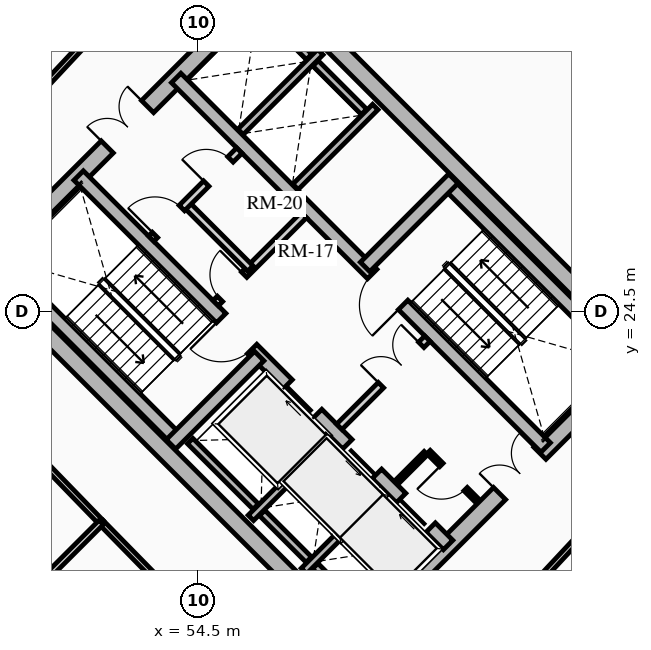
"""IFC4 building model, lengths in metres.
Left out: names, types, materials, properties, quantities, classifications, styles, units other than length and angle.
Written with IfcOpenShell. Run it as: python <this file> out.ifc"""

import sys

from ifc_helpers import new_model, si_unit, direction, frame, frame_2d, origin, place, context, subcontext, project, spatial, rectangle, extrude, source, transform, mapped, element, fill, save


model = new_model("IFC4")
c1 = context("Model", 3, precision=1e-05, world=origin(), true_north=direction((0.0, 1.0)))
c2 = subcontext(c1, "Body", "Model", "MODEL_VIEW")
j1 = project(units=[si_unit("LENGTHUNIT", "METRE"), si_unit("PLANEANGLEUNIT", "RADIAN")], contexts=[c1])
p1 = place(None, origin())
s1 = spatial("IfcSite", under=j1, at=p1, CompositionType="ELEMENT")
p2 = place(p1, origin())
s2 = spatial("IfcBuilding", under=s1, at=p2, CompositionType="ELEMENT")
p3 = place(p2, frame((0.0, 0.0, 132.88)))
s3 = spatial("IfcBuildingStorey", under=s2, at=p3, CompositionType="ELEMENT", Elevation=132.88)
for number, where, z_axis, x_axis in (
    (1, (58.737, 15.697, 0.0), (0.0, 0.0, 1.0), (-0.707, 0.707, 0.0)),
    (2, (66.303, 23.263, 0.0), (0.0, 0.0, 1.0), (-0.707, 0.707, 0.0)),
):
    element("IfcWall", number, at=place(p3, frame(where, z_axis=z_axis, x_axis=x_axis)), inside=s3, PredefinedType="SHEAR", context=c2, shape_type="SweptSolid", body=[
        extrude(rectangle(XDim=14.2, YDim=0.45, at=frame_2d((7.1, 0.0))), origin(), (0.0, 0.0, 1.0), 3.72),
    ])
p4 = place(p3, frame((58.578, 15.856, 0.0), z_axis=(0.0, 0.0, 1.0), x_axis=(0.707106781187, 0.707106781187, 0.0)))
e3 = element("IfcWall", 3, at=p4, inside=s3, PredefinedType="SHEAR", context=c2, shape_type="SweptSolid", body=[
    extrude(rectangle(XDim=10.7, YDim=0.45, at=frame_2d((5.35, 0.0))), origin(), (0.0, 0.0, 1.0), 3.72),
])
m1 = source(origin(), c2, "Body", "SweptSolid", [
    extrude(rectangle(XDim=1.5, YDim=2.02, at=frame_2d((0.75, 1.01))), frame((0.0, 0.235, 0.0), z_axis=(0.0, -1.0, 0.0), x_axis=(1.0, 0.0, 0.0)), (0.0, 0.0, 1.0), 0.47),
])
p5 = place(p4, frame((5.45, 0.0, 0.0)))
e4 = element("IfcOpeningElement", 4, at=p5, cuts=e3, PredefinedType="OPENING", context=c2, shape_type="MappedRepresentation", body=[
    mapped(m1, transform((0.0, 0.0, 0.0), x_axis=(1.0, 0.0, 0.0), y_axis=(0.0, 1.0, 0.0), z_axis=(0.0, 0.0, 1.0), scale=1.0)),
])
p6 = place(p3, frame((48.856, 25.578, 0.0), z_axis=(0.0, 0.0, 1.0), x_axis=(0.707106781187, 0.707106781187, 0.0)))
e5 = element("IfcWall", 5, at=p6, inside=s3, PredefinedType="SHEAR", context=c2, shape_type="SweptSolid", body=[
    extrude(rectangle(XDim=10.7, YDim=0.45, at=frame_2d((5.35, 0.0))), origin(), (0.0, 0.0, 1.0), 3.72),
])
p7 = place(p6, frame((4.6, 0.0, 0.0)))
e6 = element("IfcOpeningElement", 6, at=p7, cuts=e5, PredefinedType="OPENING", context=c2, shape_type="MappedRepresentation", body=[
    mapped(m1, transform((0.0, 0.0, 0.0), x_axis=(1.0, 0.0, 0.0), y_axis=(0.0, 1.0, 0.0), z_axis=(0.0, 0.0, 1.0), scale=1.0)),
])
p8 = place(p3, frame((61.078, 18.355, 0.0), z_axis=(0.0, 0.0, 1.0), x_axis=(-0.707106781187, 0.707106781187, 0.0)))
e7 = element("IfcWall", 7, at=p8, inside=s3, PredefinedType="SHEAR", context=c2, shape_type="SweptSolid", body=[
    extrude(rectangle(XDim=13.75, YDim=0.35, at=frame_2d((6.875, 0.0))), origin(), (0.0, 0.0, 1.0), 3.72),
])
m2 = source(origin(), c2, "Body", "SweptSolid", [
    extrude(rectangle(XDim=1.1, YDim=2.015, at=frame_2d((0.55, 1.007))), frame((0.0, 0.185, 0.0), z_axis=(0.0, -1.0, 0.0), x_axis=(1.0, 0.0, 0.0)), (0.0, 0.0, 1.0), 0.37),
])
p9 = place(p8, frame((4.875, 0.0, 0.0)))
e8 = element("IfcOpeningElement", 8, at=p9, cuts=e7, PredefinedType="OPENING", context=c2, shape_type="MappedRepresentation", body=[
    mapped(m2, transform((0.0, 0.0, 0.0), x_axis=(1.0, 0.0, 0.0), y_axis=(0.0, 1.0, 0.0), z_axis=(0.0, 0.0, 1.0), scale=1.0)),
])
p10 = place(p8, frame((0.65, 0.0, 0.0)))
e9 = element("IfcOpeningElement", 9, at=p10, cuts=e7, PredefinedType="OPENING", context=c2, shape_type="MappedRepresentation", body=[
    mapped(m2, transform((0.0, 0.0, 0.0), x_axis=(1.0, 0.0, 0.0), y_axis=(0.0, 1.0, 0.0), z_axis=(0.0, 0.0, 1.0), scale=1.0)),
])
p11 = place(p8, frame((2.65, 0.0, 0.0)))
e10 = element("IfcOpeningElement", 10, at=p11, cuts=e7, PredefinedType="OPENING", context=c2, shape_type="MappedRepresentation", body=[
    mapped(m2, transform((0.0, 0.0, 0.0), x_axis=(1.0, 0.0, 0.0), y_axis=(0.0, 1.0, 0.0), z_axis=(0.0, 0.0, 1.0), scale=1.0)),
])
m3 = source(origin(), c2, "Body", "SweptSolid", [
    extrude(rectangle(XDim=1.15, YDim=2.02, at=frame_2d((0.575, 1.01))), frame((0.0, 0.185, 0.0), z_axis=(0.0, -1.0, 0.0), x_axis=(1.0, 0.0, 0.0)), (0.0, 0.0, 1.0), 0.37),
])
p12 = place(p8, frame((7.295, 0.0, 0.0)))
e11 = element("IfcOpeningElement", 11, at=p12, cuts=e7, PredefinedType="OPENING", context=c2, shape_type="MappedRepresentation", body=[
    mapped(m3, transform((0.0, 0.0, 0.0), x_axis=(1.0, 0.0, 0.0), y_axis=(0.0, 1.0, 0.0), z_axis=(0.0, 0.0, 1.0), scale=1.0)),
])
p13 = place(p3, frame((63.645, 20.922, 0.0), z_axis=(0.0, 0.0, 1.0), x_axis=(-0.707106781187, 0.707106781187, 0.0)))
e12 = element("IfcWall", 12, at=p13, inside=s3, PredefinedType="SHEAR", context=c2, shape_type="SweptSolid", body=[
    extrude(rectangle(XDim=13.75, YDim=0.35, at=frame_2d((6.875, 0.0))), origin(), (0.0, 0.0, 1.0), 3.72),
])
p14 = place(p13, frame((5.305, 0.0, 0.0)))
e13 = element("IfcOpeningElement", 13, at=p14, cuts=e12, PredefinedType="OPENING", context=c2, shape_type="MappedRepresentation", body=[
    mapped(m3, transform((0.0, 0.0, 0.0), x_axis=(1.0, 0.0, 0.0), y_axis=(0.0, 1.0, 0.0), z_axis=(0.0, 0.0, 1.0), scale=1.0)),
])
p15 = place(p3, frame((53.922, 21.141, 0.0), z_axis=(0.0, 0.0, 1.0), x_axis=(-0.707088616009, 0.707124945897, 0.0)))
e14 = element("IfcWall", 14, at=p15, inside=s3, PredefinedType="SHEAR", context=c2, shape_type="SweptSolid", body=[
    extrude(rectangle(XDim=6.72, YDim=0.35, at=frame_2d((3.36, 0.0))), origin(), (0.0, 0.0, 1.0), 3.72),
])
p16 = place(p3, frame((53.784, 21.003, 0.0), z_axis=(0.0, 0.0, 1.0), x_axis=(0.707106781187, 0.707106781187, 0.0)))
e15 = element("IfcWall", 15, at=p16, inside=s3, PredefinedType="SHEAR", context=c2, shape_type="SweptSolid", body=[
    extrude(rectangle(XDim=3.285, YDim=0.35, at=frame_2d((1.643, 0.0))), origin(), (0.0, 0.0, 1.0), 3.72),
])
p17 = place(p3, frame((65.83, 23.107, 0.0), z_axis=(0.0, 0.0, 1.0), x_axis=(-0.707088616009, 0.707124945897, 0.0)))
e16 = element("IfcWall", 16, at=p17, inside=s3, PredefinedType="SHEAR", context=c2, shape_type="SweptSolid", body=[
    extrude(rectangle(XDim=6.72, YDim=0.35, at=frame_2d((3.36, 0.0))), origin(), (0.0, 0.0, 1.0), 3.72),
])
p18 = place(p3, frame((58.893, 25.674, 0.0), z_axis=(0.0, 0.0, 1.0), x_axis=(0.707106781187, 0.707106781187, 0.0)))
e17 = element("IfcWall", 17, at=p18, inside=s3, PredefinedType="SHEAR", context=c2, shape_type="SweptSolid", body=[
    extrude(rectangle(XDim=3.285, YDim=0.35, at=frame_2d((1.643, 0.0))), origin(), (0.0, 0.0, 1.0), 3.72),
])
p19 = place(p3, frame((55.888, 19.069, 0.0), z_axis=(0.0, 0.0, 1.0), x_axis=(0.707106781187, 0.707106781187, 0.0)))
e18 = element("IfcWall", 18, at=p19, inside=s3, PredefinedType="SHEAR", context=c2, shape_type="SweptSolid", body=[
    extrude(rectangle(XDim=2.97, YDim=0.2, at=frame_2d((1.485, 0.0))), origin(), (0.0, 0.0, 1.0), 3.72),
])
p20 = place(p3, frame((56.015, 19.366, 0.0), z_axis=(0.0, 0.0, 1.0), x_axis=(-0.707106781187, 0.707106781187, 0.0)))
e19 = element("IfcWall", 19, at=p20, inside=s3, PredefinedType="SHEAR", context=c2, shape_type="SweptSolid", body=[
    extrude(rectangle(XDim=2.44, YDim=0.2, at=frame_2d((1.22, 0.0))), origin(), (0.0, 0.0, 1.0), 3.72),
])
p21 = place(p3, frame((57.284, 17.673, 0.0), z_axis=(0.0, 0.0, 1.0), x_axis=(0.707147878904, 0.70706568108, 0.0)))
e20 = element("IfcWall", 20, at=p21, inside=s3, PredefinedType="SHEAR", context=c2, shape_type="SweptSolid", body=[
    extrude(rectangle(XDim=2.97, YDim=0.2, at=frame_2d((1.485, 0.0))), origin(), (0.0, 0.0, 1.0), 3.72),
])
p22 = place(p3, frame((57.412, 17.97, 0.0), z_axis=(0.0, 0.0, 1.0), x_axis=(-0.707106781187, 0.707106781187, 0.0)))
e21 = element("IfcWall", 21, at=p22, inside=s3, PredefinedType="SHEAR", context=c2, shape_type="SweptSolid", body=[
    extrude(rectangle(XDim=1.735, YDim=0.2, at=frame_2d((0.867, 0.0))), origin(), (0.0, 0.0, 1.0), 3.72),
])
p23 = place(p3, frame((58.737, 16.644, 0.0), z_axis=(0.0, 0.0, 1.0), x_axis=(-0.707032117043, 0.707181437447, 0.0)))
e22 = element("IfcWall", 22, at=p23, inside=s3, PredefinedType="SHEAR", context=c2, shape_type="SweptSolid", body=[
    extrude(rectangle(XDim=1.635, YDim=0.2, at=frame_2d((0.817, 0.0))), origin(), (0.0, 0.0, 1.0), 3.72),
])
p24 = place(p3, frame((57.062, 27.781, 0.0), z_axis=(0.0, 0.0, 1.0), x_axis=(0.707106781187, 0.707106781187, 0.0)))
e23 = element("IfcWall", 23, at=p24, inside=s3, PredefinedType="SHEAR", context=c2, shape_type="SweptSolid", body=[
    extrude(rectangle(XDim=2.97, YDim=0.2, at=frame_2d((1.485, 0.0))), origin(), (0.0, 0.0, 1.0), 3.72),
])
p25 = place(p3, frame((55.615, 29.227, 0.0), z_axis=(0.0, 0.0, 1.0), x_axis=(0.707147878904, 0.70706568108, 0.0)))
e24 = element("IfcWall", 24, at=p25, inside=s3, PredefinedType="SHEAR", context=c2, shape_type="SweptSolid", body=[
    extrude(rectangle(XDim=2.97, YDim=0.2, at=frame_2d((1.485, 0.0))), origin(), (0.0, 0.0, 1.0), 3.72),
])
p26 = place(p3, frame((58.865, 29.754, 0.0), z_axis=(0.0, 0.0, 1.0), x_axis=(-0.707174411312, 0.707039144592, 0.0)))
e25 = element("IfcWall", 25, at=p26, inside=s3, PredefinedType="SHEAR", context=c2, shape_type="SweptSolid", body=[
    extrude(rectangle(XDim=1.805, YDim=0.2, at=frame_2d((0.902, 0.0))), origin(), (0.0, 0.0, 1.0), 3.72),
])
p27 = place(p3, frame((57.419, 31.2, 0.0), z_axis=(0.0, 0.0, 1.0), x_axis=(-0.707032117043, 0.707181437447, 0.0)))
e26 = element("IfcWall", 26, at=p27, inside=s3, PredefinedType="SHEAR", context=c2, shape_type="SweptSolid", body=[
    extrude(rectangle(XDim=1.635, YDim=0.2, at=frame_2d((0.817, 0.0))), origin(), (0.0, 0.0, 1.0), 3.72),
])
p28 = place(p3, frame((58.214, 21.467, 0.0), z_axis=(0.0, 0.0, 1.0), x_axis=(0.707106781187, 0.707106781187, 0.0)))
e27 = element("IfcWall", 27, at=p28, inside=s3, PredefinedType="PARTITIONING", context=c2, shape_type="SweptSolid", body=[
    extrude(rectangle(XDim=3.28, YDim=0.2, at=frame_2d((1.64, 0.0))), origin(), (0.0, 0.0, 1.0), 3.425),
])
m4 = source(origin(), c2, "Body", "SweptSolid", [
    extrude(rectangle(XDim=1.5, YDim=2.02, at=frame_2d((0.75, 1.01))), frame((0.0, 0.11, 0.0), z_axis=(0.0, -1.0, 0.0), x_axis=(1.0, 0.0, 0.0)), (0.0, 0.0, 1.0), 0.22),
])
p29 = place(p28, frame((1.55, 0.0, 0.0)))
e28 = element("IfcOpeningElement", 28, at=p29, cuts=e27, PredefinedType="OPENING", context=c2, shape_type="MappedRepresentation", body=[
    mapped(m4, transform((0.0, 0.0, 0.0), x_axis=(1.0, 0.0, 0.0), y_axis=(0.0, 1.0, 0.0), z_axis=(0.0, 0.0, 1.0), scale=1.0)),
])
p30 = place(p3, frame((54.961, 24.719, 0.0), z_axis=(0.0, 0.0, 1.0), x_axis=(0.707106781187, 0.707106781187, 0.0)))
e29 = element("IfcWall", 29, at=p30, inside=s3, PredefinedType="PARTITIONING", context=c2, shape_type="SweptSolid", body=[
    extrude(rectangle(XDim=3.28, YDim=0.2, at=frame_2d((1.64, 0.0))), origin(), (0.0, 0.0, 1.0), 3.425),
])
m5 = source(origin(), c2, "Body", "SweptSolid", [
    extrude(rectangle(XDim=0.9, YDim=2.005, at=frame_2d((0.45, 1.002))), frame((0.0, 0.11, 0.0), z_axis=(0.0, -1.0, 0.0), x_axis=(1.0, 0.0, 0.0)), (0.0, 0.0, 1.0), 0.22),
])
p31 = place(p30, frame((0.16, 0.0, 0.0)))
e30 = element("IfcOpeningElement", 30, at=p31, cuts=e29, PredefinedType="OPENING", context=c2, shape_type="MappedRepresentation", body=[
    mapped(m5, transform((0.0, 0.0, 0.0), x_axis=(1.0, 0.0, 0.0), y_axis=(0.0, 1.0, 0.0), z_axis=(0.0, 0.0, 1.0), scale=1.0)),
])
p32 = place(p3, frame((55.874, 25.631, 0.0), z_axis=(0.0, 0.0, 1.0), x_axis=(-0.707157639372, 0.707055919343, 0.0)))
e31 = element("IfcWall", 31, at=p32, inside=s3, PredefinedType="PARTITIONING", context=c2, shape_type="SweptSolid", body=[
    extrude(rectangle(XDim=2.4, YDim=0.2, at=frame_2d((1.2, 0.0))), origin(), (0.0, 0.0, 1.0), 3.425),
])
p33 = place(p3, frame((53.264, 26.416, 0.0), z_axis=(0.0, 0.0, 1.0), x_axis=(0.707106781187, 0.707106781187, 0.0)))
e32 = element("IfcWall", 32, at=p33, inside=s3, PredefinedType="PARTITIONING", context=c2, shape_type="SweptSolid", body=[
    extrude(rectangle(XDim=3.28, YDim=0.2, at=frame_2d((1.64, 0.0))), origin(), (0.0, 0.0, 1.0), 3.425),
])
m6 = source(origin(), c2, "Body", "SweptSolid", [
    extrude(rectangle(XDim=1.0, YDim=2.015, at=frame_2d((0.5, 1.007))), frame((0.0, 0.11, 0.0), z_axis=(0.0, -1.0, 0.0), x_axis=(1.0, 0.0, 0.0)), (0.0, 0.0, 1.0), 0.22),
])
p34 = place(p33, frame((0.14, 0.0, 0.0)))
e33 = element("IfcOpeningElement", 33, at=p34, cuts=e32, PredefinedType="OPENING", context=c2, shape_type="MappedRepresentation", body=[
    mapped(m6, transform((0.0, 0.0, 0.0), x_axis=(1.0, 0.0, 0.0), y_axis=(0.0, 1.0, 0.0), z_axis=(0.0, 0.0, 1.0), scale=1.0)),
])
p35 = place(p33, frame((2.05, 0.0, 0.0)))
e34 = element("IfcOpeningElement", 34, at=p35, cuts=e32, PredefinedType="OPENING", context=c2, shape_type="MappedRepresentation", body=[
    mapped(m5, transform((0.0, 0.0, 0.0), x_axis=(1.0, 0.0, 0.0), y_axis=(0.0, 1.0, 0.0), z_axis=(0.0, 0.0, 1.0), scale=1.0)),
])
p36 = place(p3, frame((61.835, 19.529, 0.0), z_axis=(0.0, 0.0, 1.0), x_axis=(-0.707174592913, 0.707038962956, 0.0)))
e35 = element("IfcWall", 35, at=p36, inside=s3, PredefinedType="PARTITIONING", context=c2, shape_type="SweptSolid", body=[
    extrude(rectangle(XDim=1.8, YDim=0.125, at=frame_2d((0.9, 0.0))), origin(), (0.0, 0.0, 1.0), 3.425),
])
m7 = source(origin(), c2, "Body", "SweptSolid", [
    extrude(rectangle(XDim=0.9, YDim=2.005, at=frame_2d((0.45, 1.002))), frame((0.0, 0.073, 0.0), z_axis=(0.0, -1.0, 0.0), x_axis=(1.0, 0.0, 0.0)), (0.0, 0.0, 1.0), 0.145),
])
p37 = place(p36, frame((0.42, 0.0, 0.0)))
e36 = element("IfcOpeningElement", 36, at=p37, cuts=e35, PredefinedType="OPENING", context=c2, shape_type="MappedRepresentation", body=[
    mapped(m7, transform((0.0, 0.0, 0.0), x_axis=(1.0, 0.0, 0.0), y_axis=(0.0, 1.0, 0.0), z_axis=(0.0, 0.0, 1.0), scale=1.0)),
])
p38 = place(p3, frame((59.713, 19.996, 0.0), z_axis=(0.0, 0.0, 1.0), x_axis=(0.707217726, 0.706995818963, 0.0)))
e37 = element("IfcWall", 37, at=p38, inside=s3, PredefinedType="PARTITIONING", context=c2, shape_type="SweptSolid", body=[
    extrude(rectangle(XDim=1.1, YDim=0.125, at=frame_2d((0.55, 0.0))), origin(), (0.0, 0.0, 1.0), 3.425),
])
p39 = place(p3, frame((52.107, 32.202, 0.0), z_axis=(0.0, 0.0, 1.0), x_axis=(-0.682605209028, -0.730787334734, 0.0)))
e38 = element("IfcWall", 38, at=p39, inside=s3, PredefinedType="PARTITIONING", context=c2, shape_type="SweptSolid", body=[
    extrude(rectangle(XDim=6.486, YDim=0.15, at=frame_2d((3.243, 0.0))), origin(), (0.0, 0.0, 1.0), 2.995),
])
p40 = place(p3, frame((47.786, 23.242, 0.0), z_axis=(0.0, 0.0, 1.0), x_axis=(0.696183456981, -0.717863910659, 0.0)))
e39 = element("IfcWall", 39, at=p40, inside=s3, PredefinedType="PARTITIONING", context=c2, shape_type="SweptSolid", body=[
    extrude(rectangle(XDim=5.979, YDim=0.15, at=frame_2d((2.99, 0.0))), origin(), (0.0, 0.0, 1.0), 3.425),
])
p41 = place(p3, frame((51.949, 18.949, 0.0), z_axis=(0.0, 0.0, 1.0), x_axis=(0.699801520154, -0.714337337951, 0.0)))
e40 = element("IfcWall", 40, at=p41, inside=s3, PredefinedType="PARTITIONING", context=c2, shape_type="SweptSolid", body=[
    extrude(rectangle(XDim=6.097, YDim=0.15, at=frame_2d((3.048, 0.0))), origin(), (0.0, 0.0, 1.0), 2.995),
])
p42 = place(p3, frame((62.839, 16.745, 0.0), z_axis=(0.0, 0.0, 1.0), x_axis=(0.682386779427, 0.73099130177, 0.0)))
e41 = element("IfcWall", 41, at=p42, inside=s3, PredefinedType="PARTITIONING", context=c2, shape_type="SweptSolid", body=[
    extrude(rectangle(XDim=6.6, YDim=0.15, at=frame_2d((3.3, 0.0))), origin(), (0.0, 0.0, 1.0), 2.995),
])
p43 = place(p3, frame((51.949, 18.949, 0.0), z_axis=(0.0, 0.0, 1.0), x_axis=(-0.707106781187, -0.707106781187, 0.0)))
e42 = element("IfcWall", 42, at=p43, inside=s3, PredefinedType="PARTITIONING", context=c2, shape_type="SweptSolid", body=[
    extrude(rectangle(XDim=7.711, YDim=0.16, at=frame_2d((3.855, 0.0))), origin(), (0.0, 0.0, 1.0), 2.512),
])
m8 = source(origin(), c2, "Body", "SweptSolid", [
    extrude(rectangle(XDim=1.1, YDim=2.015, at=frame_2d((0.55, 1.007))), frame((0.0, 0.025, 0.0), z_axis=(0.0, -1.0, 0.0), x_axis=(1.0, 0.0, 0.0)), (0.0, 0.0, 1.0), 0.05),
])
p44 = place(p9, origin())
e43 = element("IfcDoor", 43, at=p44, inside=s3, OperationType="SLIDING_TO_RIGHT", PredefinedType="DOOR", context=c2, shape_type="MappedRepresentation", body=[
    mapped(m8, transform((0.0, 0.0, 0.0), x_axis=(1.0, 0.0, 0.0), y_axis=(0.0, 1.0, 0.0), z_axis=(0.0, 0.0, 1.0), scale=1.0)),
])
fill(e8, e43)
p45 = place(p10, origin())
e44 = element("IfcDoor", 44, at=p45, inside=s3, OperationType="SLIDING_TO_RIGHT", PredefinedType="DOOR", context=c2, shape_type="MappedRepresentation", body=[
    mapped(m8, transform((0.0, 0.0, 0.0), x_axis=(1.0, 0.0, 0.0), y_axis=(0.0, 1.0, 0.0), z_axis=(0.0, 0.0, 1.0), scale=1.0)),
])
fill(e9, e44)
p46 = place(p11, origin())
e45 = element("IfcDoor", 45, at=p46, inside=s3, OperationType="SLIDING_TO_LEFT", PredefinedType="DOOR", context=c2, shape_type="MappedRepresentation", body=[
    mapped(m8, transform((0.0, 0.0, 0.0), x_axis=(1.0, 0.0, 0.0), y_axis=(0.0, 1.0, 0.0), z_axis=(0.0, 0.0, 1.0), scale=1.0)),
])
fill(e10, e45)
m9 = source(origin(), c2, "Body", "SweptSolid", [
    extrude(rectangle(XDim=1.15, YDim=2.02, at=frame_2d((0.575, 1.01))), frame((0.0, 0.025, 0.0), z_axis=(0.0, -1.0, 0.0), x_axis=(1.0, 0.0, 0.0)), (0.0, 0.0, 1.0), 0.05),
])
p47 = place(p12, origin())
e46 = element("IfcDoor", 46, at=p47, inside=s3, OperationType="SINGLE_SWING_RIGHT", PredefinedType="DOOR", context=c2, shape_type="MappedRepresentation", body=[
    mapped(m9, transform((0.0, 0.0, 0.0), x_axis=(1.0, 0.0, 0.0), y_axis=(0.0, 1.0, 0.0), z_axis=(0.0, 0.0, 1.0), scale=1.0)),
])
fill(e11, e46)
p48 = place(p14, origin())
e47 = element("IfcDoor", 47, at=p48, inside=s3, OperationType="SINGLE_SWING_LEFT", PredefinedType="DOOR", context=c2, shape_type="MappedRepresentation", body=[
    mapped(m9, transform((0.0, 0.0, 0.0), x_axis=(1.0, 0.0, 0.0), y_axis=(0.0, 1.0, 0.0), z_axis=(0.0, 0.0, 1.0), scale=1.0)),
])
fill(e13, e47)
m10 = source(origin(), c2, "Body", "SweptSolid", [
    extrude(rectangle(XDim=1.5, YDim=2.02, at=frame_2d((0.75, 1.01))), frame((0.0, 0.025, 0.0), z_axis=(0.0, -1.0, 0.0), x_axis=(1.0, 0.0, 0.0)), (0.0, 0.0, 1.0), 0.05),
])
p49 = place(p7, origin())
e48 = element("IfcDoor", 48, at=p49, inside=s3, OperationType="DOUBLE_DOOR_SINGLE_SWING", PredefinedType="DOOR", context=c2, shape_type="MappedRepresentation", body=[
    mapped(m10, transform((0.0, 0.0, 0.0), x_axis=(1.0, 0.0, 0.0), y_axis=(0.0, 1.0, 0.0), z_axis=(0.0, 0.0, 1.0), scale=1.0)),
])
fill(e6, e48)
p50 = place(p5, origin())
e49 = element("IfcDoor", 49, at=p50, inside=s3, OperationType="DOUBLE_DOOR_SINGLE_SWING", PredefinedType="DOOR", context=c2, shape_type="MappedRepresentation", body=[
    mapped(m10, transform((0.0, 0.0, 0.0), x_axis=(1.0, 0.0, 0.0), y_axis=(0.0, 1.0, 0.0), z_axis=(0.0, 0.0, 1.0), scale=1.0)),
])
fill(e4, e49)
p51 = place(p29, origin())
e50 = element("IfcDoor", 50, at=p51, inside=s3, OperationType="DOUBLE_DOOR_SINGLE_SWING", PredefinedType="DOOR", context=c2, shape_type="MappedRepresentation", body=[
    mapped(m10, transform((0.0, 0.0, 0.0), x_axis=(1.0, 0.0, 0.0), y_axis=(0.0, 1.0, 0.0), z_axis=(0.0, 0.0, 1.0), scale=1.0)),
])
fill(e28, e50)
m11 = source(origin(), c2, "Body", "SweptSolid", [
    extrude(rectangle(XDim=0.9, YDim=2.005, at=frame_2d((0.45, 1.002))), frame((0.0, 0.025, 0.0), z_axis=(0.0, -1.0, 0.0), x_axis=(1.0, 0.0, 0.0)), (0.0, 0.0, 1.0), 0.05),
])
p52 = place(p31, origin())
e51 = element("IfcDoor", 51, at=p52, inside=s3, OperationType="SINGLE_SWING_RIGHT", PredefinedType="DOOR", context=c2, shape_type="MappedRepresentation", body=[
    mapped(m11, transform((0.0, 0.0, 0.0), x_axis=(1.0, 0.0, 0.0), y_axis=(0.0, 1.0, 0.0), z_axis=(0.0, 0.0, 1.0), scale=1.0)),
])
fill(e30, e51)
m12 = source(origin(), c2, "Body", "SweptSolid", [
    extrude(rectangle(XDim=1.0, YDim=2.015, at=frame_2d((0.5, 1.007))), frame((0.0, 0.025, 0.0), z_axis=(0.0, -1.0, 0.0), x_axis=(1.0, 0.0, 0.0)), (0.0, 0.0, 1.0), 0.05),
])
p53 = place(p34, origin())
e52 = element("IfcDoor", 52, at=p53, inside=s3, OperationType="SINGLE_SWING_LEFT", PredefinedType="DOOR", context=c2, shape_type="MappedRepresentation", body=[
    mapped(m12, transform((0.0, 0.0, 0.0), x_axis=(1.0, 0.0, 0.0), y_axis=(0.0, 1.0, 0.0), z_axis=(0.0, 0.0, 1.0), scale=1.0)),
])
fill(e33, e52)
p54 = place(p37, origin())
e53 = element("IfcDoor", 53, at=p54, inside=s3, OperationType="SINGLE_SWING_RIGHT", PredefinedType="DOOR", context=c2, shape_type="MappedRepresentation", body=[
    mapped(m11, transform((0.0, 0.0, 0.0), x_axis=(1.0, 0.0, 0.0), y_axis=(0.0, 1.0, 0.0), z_axis=(0.0, 0.0, 1.0), scale=1.0)),
])
fill(e36, e53)
p55 = place(p35, origin())
e54 = element("IfcDoor", 54, at=p55, inside=s3, OperationType="SINGLE_SWING_LEFT", PredefinedType="DOOR", context=c2, shape_type="MappedRepresentation", body=[
    mapped(m11, transform((0.0, 0.0, 0.0), x_axis=(1.0, 0.0, 0.0), y_axis=(0.0, 1.0, 0.0), z_axis=(0.0, 0.0, 1.0), scale=1.0)),
])
fill(e34, e54)
save(model, sys.argv[1])
